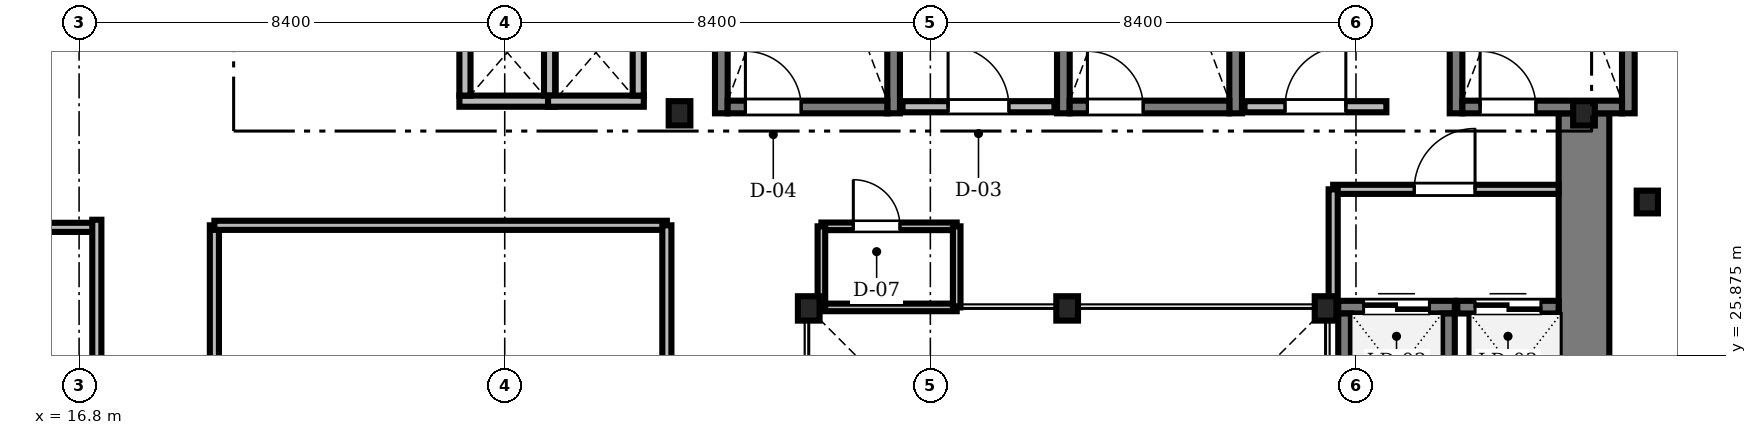
"""IFC4 building model, lengths in metres.
Left out: names, types, materials, properties, quantities, classifications, styles, units other than length and angle.
Written with IfcOpenShell. Run it as: python <this file> out.ifc"""

import sys

from ifc_helpers import new_model, si_unit, direction, frame, frame_2d, origin, origin_2d, place, context, subcontext, project, spatial, rectangle, i_section, extrude, source, transform, mapped, element, fill, save


model = new_model("IFC4")
c1 = context("Model", 3, precision=1e-05, world=origin(), true_north=direction((0.0, 1.0)))
c2 = subcontext(c1, "Body", "Model", "MODEL_VIEW")
j1 = project(units=[si_unit("LENGTHUNIT", "METRE"), si_unit("PLANEANGLEUNIT", "RADIAN")], contexts=[c1])
p1 = place(None, origin())
s1 = spatial("IfcSite", under=j1, at=p1, CompositionType="ELEMENT")
p2 = place(p1, origin())
s2 = spatial("IfcBuilding", under=s1, at=p2, CompositionType="ELEMENT")
p3 = place(p2, frame((0.0, 0.0, 86.0)))
s3 = spatial("IfcBuildingStorey", under=s2, at=p3, CompositionType="ELEMENT", Elevation=86.0)
m1 = source(origin(), c2, "Body", "SweptSolid", [
    extrude(rectangle(XDim=13.15, YDim=1.0, at=frame_2d((6.575, 0.0))), origin(), (0.0, 0.0, 1.0), 3.41),
])
p4 = place(p3, frame((46.5, 17.5, 0.0), z_axis=(0.0, 0.0, 1.0), x_axis=(0.0, 1.0, 0.0)))
e1 = element("IfcWall", 1, at=p4, inside=s3, PredefinedType="SHEAR", context=c2, shape_type="MappedRepresentation", body=[
    mapped(m1, transform((0.0, 0.0, 0.0), scale=1.0)),
])
m2 = source(origin(), c2, "Body", "SweptSolid", [
    extrude(i_section(OverallWidth=0.428, OverallDepth=0.481, WebThickness=0.04, FlangeThickness=0.063, FilletRadius=0.015, at=origin_2d()), origin(), (0.0, 0.0, 1.0), 3.41),
])
for number, where, z_axis, x_axis in (
    (2, (41.4, 26.8, 0.0), (0.0, 0.0, 1.0), (1.0, 0.0, 0.0)),
    (3, (36.3, 26.8, 0.0), (0.0, 0.0, 1.0), (1.0, 0.0, 0.0)),
    (4, (31.2, 26.8, 0.0), (0.0, 0.0, 1.0), (1.0, 0.0, 0.0)),
    (5, (28.65, 30.65, 0.0), (0.0, 0.0, 1.0), (1.0, 0.0, 0.0)),
    (6, (46.5, 30.65, 0.0), (0.0, 0.0, 1.0), (1.0, 0.0, 0.0)),
):
    element("IfcColumn", number, at=place(p3, frame(where, z_axis=z_axis, x_axis=x_axis)), inside=s3, PredefinedType="COLUMN", context=c2, shape_type="MappedRepresentation", body=[
        mapped(m2, transform((0.0, 0.0, 0.0), scale=1.0)),
    ])
m3 = source(origin(), c2, "Body", "SweptSolid", [
    extrude(i_section(OverallWidth=0.419, OverallDepth=0.449, WebThickness=0.031, FlangeThickness=0.048, FilletRadius=0.015, at=origin_2d()), origin(), (0.0, 0.0, 1.0), 3.41),
])
p5 = place(p3, frame((47.75, 28.9, 0.0), z_axis=(0.0, 0.0, 1.0), x_axis=(1.0, 0.0, 0.0)))
e7 = element("IfcColumn", 7, at=p5, inside=s3, PredefinedType="COLUMN", context=c2, shape_type="MappedRepresentation", body=[
    mapped(m3, transform((0.0, 0.0, 0.0), scale=1.0)),
])
m4 = source(origin(), c2, "Body", "SweptSolid", [
    extrude(rectangle(XDim=9.15, YDim=0.25, at=frame_2d((4.575, 0.0))), origin(), (0.0, 0.0, 1.0), 3.45),
])
for number, where, z_axis, x_axis in (
    (8, (29.475, 30.65, 0.0), (0.0, 0.0, 1.0), (0.0, 1.0, 0.0)),
    (9, (32.875, 30.65, 0.0), (0.0, 0.0, 1.0), (0.0, 1.0, 0.0)),
):
    element("IfcWall", number, at=place(p3, frame(where, z_axis=z_axis, x_axis=x_axis)), inside=s3, PredefinedType="SOLIDWALL", context=c2, shape_type="MappedRepresentation", body=[
        mapped(m4, transform((0.0, 0.0, 0.0), scale=1.0)),
    ])
m5 = source(origin(), c2, "Body", "SweptSolid", [
    extrude(rectangle(XDim=3.15, YDim=0.25, at=frame_2d((1.575, 0.0))), origin(), (0.0, 0.0, 1.0), 3.45),
])
p6 = place(p3, frame((29.6, 30.775, 0.0), z_axis=(0.0, 0.0, 1.0), x_axis=(1.0, 0.0, 0.0)))
e10 = element("IfcWall", 10, at=p6, inside=s3, PredefinedType="SOLIDWALL", context=c2, shape_type="MappedRepresentation", body=[
    mapped(m5, transform((0.0, 0.0, 0.0), scale=1.0)),
])
m6 = source(origin(), c2, "Body", "SweptSolid", [
    extrude(rectangle(XDim=1.1, YDim=2.2, at=frame_2d((0.55, 1.1))), frame((0.0, 0.135, 0.0), z_axis=(0.0, -1.0, 0.0), x_axis=(1.0, 0.0, 0.0)), (0.0, 0.0, 1.0), 0.27),
])
p7 = place(p6, frame((0.35, 0.0, 0.0)))
e11 = element("IfcOpeningElement", 11, at=p7, cuts=e10, PredefinedType="OPENING", context=c2, shape_type="MappedRepresentation", body=[
    mapped(m6, transform((0.0, 0.0, 0.0), scale=1.0)),
])
for number, where, z_axis, x_axis in (
    (12, (36.225, 30.65, 0.0), (0.0, 0.0, 1.0), (0.0, 1.0, 0.0)),
    (13, (39.625, 30.65, 0.0), (0.0, 0.0, 1.0), (0.0, 1.0, 0.0)),
):
    element("IfcWall", number, at=place(p3, frame(where, z_axis=z_axis, x_axis=x_axis)), inside=s3, PredefinedType="SOLIDWALL", context=c2, shape_type="MappedRepresentation", body=[
        mapped(m4, transform((0.0, 0.0, 0.0), scale=1.0)),
    ])
p8 = place(p3, frame((36.35, 30.775, 0.0), z_axis=(0.0, 0.0, 1.0), x_axis=(1.0, 0.0, 0.0)))
e14 = element("IfcWall", 14, at=p8, inside=s3, PredefinedType="SOLIDWALL", context=c2, shape_type="MappedRepresentation", body=[
    mapped(m5, transform((0.0, 0.0, 0.0), scale=1.0)),
])
p9 = place(p8, frame((0.35, 0.0, 0.0)))
e15 = element("IfcOpeningElement", 15, at=p9, cuts=e14, PredefinedType="OPENING", context=c2, shape_type="MappedRepresentation", body=[
    mapped(m6, transform((0.0, 0.0, 0.0), scale=1.0)),
])
for number, where, z_axis, x_axis in (
    (16, (43.975, 30.65, 0.0), (0.0, 0.0, 1.0), (0.0, 1.0, 0.0)),
    (17, (47.375, 30.65, 0.0), (0.0, 0.0, 1.0), (0.0, 1.0, 0.0)),
):
    element("IfcWall", number, at=place(p3, frame(where, z_axis=z_axis, x_axis=x_axis)), inside=s3, PredefinedType="SOLIDWALL", context=c2, shape_type="MappedRepresentation", body=[
        mapped(m4, transform((0.0, 0.0, 0.0), scale=1.0)),
    ])
p10 = place(p3, frame((44.1, 30.775, 0.0), z_axis=(0.0, 0.0, 1.0), x_axis=(1.0, 0.0, 0.0)))
e18 = element("IfcWall", 18, at=p10, inside=s3, PredefinedType="SOLIDWALL", context=c2, shape_type="MappedRepresentation", body=[
    mapped(m5, transform((0.0, 0.0, 0.0), scale=1.0)),
])
p11 = place(p10, frame((0.35, 0.0, 0.0)))
e19 = element("IfcOpeningElement", 19, at=p11, cuts=e18, PredefinedType="OPENING", context=c2, shape_type="MappedRepresentation", body=[
    mapped(m6, transform((0.0, 0.0, 0.0), scale=1.0)),
])
m7 = source(origin(), c2, "Body", "SweptSolid", [
    extrude(rectangle(XDim=3.0, YDim=0.22, at=frame_2d((1.5, 0.0))), origin(), (0.0, 0.0, 1.0), 3.41),
])
p12 = place(p3, frame((33.05, 30.78, 0.0), z_axis=(0.0, 0.0, 1.0), x_axis=(1.0, 0.0, 0.0)))
e20 = element("IfcWall", 20, at=p12, inside=s3, PredefinedType="SOLIDWALL", context=c2, shape_type="MappedRepresentation", body=[
    mapped(m7, transform((0.0, 0.0, 0.0), scale=1.0)),
])
m8 = source(origin(), c2, "Body", "SweptSolid", [
    extrude(rectangle(XDim=1.2, YDim=2.2, at=frame_2d((0.6, 1.1))), frame((0.0, 0.12, 0.0), z_axis=(0.0, -1.0, 0.0), x_axis=(1.0, 0.0, 0.0)), (0.0, 0.0, 1.0), 0.24),
])
p13 = place(p12, frame((0.9, 0.0, 0.0)))
e21 = element("IfcOpeningElement", 21, at=p13, cuts=e20, PredefinedType="OPENING", context=c2, shape_type="MappedRepresentation", body=[
    mapped(m8, transform((0.0, 0.0, 0.0), scale=1.0)),
])
m9 = source(origin(), c2, "Body", "SweptSolid", [
    extrude(rectangle(XDim=2.8, YDim=0.22, at=frame_2d((1.4, 0.0))), origin(), (0.0, 0.0, 1.0), 3.41),
])
p14 = place(p3, frame((39.8, 30.78, 0.0), z_axis=(0.0, 0.0, 1.0), x_axis=(1.0, 0.0, 0.0)))
e22 = element("IfcWall", 22, at=p14, inside=s3, PredefinedType="SOLIDWALL", context=c2, shape_type="MappedRepresentation", body=[
    mapped(m9, transform((0.0, 0.0, 0.0), scale=1.0)),
])
p15 = place(p14, frame((0.8, 0.0, 0.0)))
e23 = element("IfcOpeningElement", 23, at=p15, cuts=e22, PredefinedType="OPENING", context=c2, shape_type="MappedRepresentation", body=[
    mapped(m8, transform((0.0, 0.0, 0.0), scale=1.0)),
])
m10 = source(origin(), c2, "Body", "SweptSolid", [
    extrude(rectangle(XDim=1.89, YDim=0.22, at=frame_2d((0.945, 0.0))), origin(), (0.0, 0.0, 1.0), 3.41),
])
p16 = place(p3, frame((24.305, 30.89, 0.0), z_axis=(0.0, 0.0, 1.0), x_axis=(1.0, 0.0, 0.0)))
e24 = element("IfcWall", 24, at=p16, inside=s3, PredefinedType="SOLIDWALL", context=c2, shape_type="MappedRepresentation", body=[
    mapped(m10, transform((0.0, 0.0, 0.0), scale=1.0)),
])
m11 = source(origin(), c2, "Body", "SweptSolid", [
    extrude(rectangle(XDim=1.7, YDim=0.22, at=frame_2d((0.85, 0.0))), origin(), (0.0, 0.0, 1.0), 3.41),
])
for number, where, z_axis, x_axis in (
    (25, (24.415, 31.0, 0.0), (0.0, 0.0, 1.0), (0.0, 1.0, 0.0)),
    (26, (26.085, 31.0, 0.0), (0.0, 0.0, 1.0), (0.0, 1.0, 0.0)),
):
    element("IfcWall", number, at=place(p3, frame(where, z_axis=z_axis, x_axis=x_axis)), inside=s3, PredefinedType="SOLIDWALL", context=c2, shape_type="MappedRepresentation", body=[
        mapped(m11, transform((0.0, 0.0, 0.0), scale=1.0)),
    ])
p17 = place(p3, frame((26.055, 30.89, 0.0), z_axis=(0.0, 0.0, 1.0), x_axis=(1.0, 0.0, 0.0)))
e27 = element("IfcWall", 27, at=p17, inside=s3, PredefinedType="SOLIDWALL", context=c2, shape_type="MappedRepresentation", body=[
    mapped(m10, transform((0.0, 0.0, 0.0), scale=1.0)),
])
p18 = place(p3, frame((27.835, 31.0, 0.0), z_axis=(0.0, 0.0, 1.0), x_axis=(0.0, 1.0, 0.0)))
e28 = element("IfcWall", 28, at=p18, inside=s3, PredefinedType="SOLIDWALL", context=c2, shape_type="MappedRepresentation", body=[
    mapped(m11, transform((0.0, 0.0, 0.0), scale=1.0)),
])
m12 = source(origin(), c2, "Body", "SweptSolid", [
    extrude(rectangle(XDim=2.3, YDim=0.25, at=frame_2d((1.15, 0.0))), origin(), (0.0, 0.0, 1.0), 3.41),
])
p19 = place(p3, frame((41.65, 26.825, 0.0), z_axis=(0.0, 0.0, 1.0), x_axis=(1.0, 0.0, 0.0)))
e29 = element("IfcWall", 29, at=p19, inside=s3, PredefinedType="SOLIDWALL", context=c2, shape_type="MappedRepresentation", body=[
    mapped(m12, transform((0.0, 0.0, 0.0), scale=1.0)),
])
m13 = source(origin(), c2, "Body", "SweptSolid", [
    extrude(rectangle(XDim=1.3, YDim=2.3, at=frame_2d((0.65, 1.15))), frame((0.0, 0.135, 0.0), z_axis=(0.0, -1.0, 0.0), x_axis=(1.0, 0.0, 0.0)), (0.0, 0.0, 1.0), 0.27),
])
p20 = place(p19, frame((0.5, 0.0, 0.0)))
e30 = element("IfcOpeningElement", 30, at=p20, cuts=e29, PredefinedType="OPENING", context=c2, shape_type="MappedRepresentation", body=[
    mapped(m13, transform((0.0, 0.0, 0.0), scale=1.0)),
])
for number, where, z_axis, x_axis in (
    (31, (41.775, 24.4, 0.0), (0.0, 0.0, 1.0), (0.0, 1.0, 0.0)),
    (32, (43.825, 24.4, 0.0), (0.0, 0.0, 1.0), (0.0, 1.0, 0.0)),
):
    element("IfcWall", number, at=place(p3, frame(where, z_axis=z_axis, x_axis=x_axis)), inside=s3, PredefinedType="SOLIDWALL", context=c2, shape_type="MappedRepresentation", body=[
        mapped(m12, transform((0.0, 0.0, 0.0), scale=1.0)),
    ])
m14 = source(origin(), c2, "Body", "SweptSolid", [
    extrude(rectangle(XDim=2.0, YDim=0.25, at=frame_2d((1.0, 0.0))), origin(), (0.0, 0.0, 1.0), 3.41),
])
p21 = place(p3, frame((44.0, 26.825, 0.0), z_axis=(0.0, 0.0, 1.0), x_axis=(1.0, 0.0, 0.0)))
e33 = element("IfcWall", 33, at=p21, inside=s3, PredefinedType="SOLIDWALL", context=c2, shape_type="MappedRepresentation", body=[
    mapped(m14, transform((0.0, 0.0, 0.0), scale=1.0)),
])
p22 = place(p21, frame((0.35, 0.0, 0.0)))
e34 = element("IfcOpeningElement", 34, at=p22, cuts=e33, PredefinedType="OPENING", context=c2, shape_type="MappedRepresentation", body=[
    mapped(m13, transform((0.0, 0.0, 0.0), scale=1.0)),
])
m15 = source(origin(), c2, "Body", "SweptSolid", [
    extrude(rectangle(XDim=6.54, YDim=0.18, at=frame_2d((3.27, 0.0))), origin(), (0.0, 0.0, 1.0), 2.802),
])
p23 = place(p3, frame((19.47, 21.9, 0.0), z_axis=(0.0, 0.0, 1.0), x_axis=(0.0, 1.0, 0.0)))
e35 = element("IfcWall", 35, at=p23, inside=s3, PredefinedType="PARTITIONING", context=c2, shape_type="MappedRepresentation", body=[
    mapped(m15, transform((0.0, 0.0, 0.0), scale=1.0)),
])
m16 = source(origin(), c2, "Body", "SweptSolid", [
    extrude(rectangle(XDim=1.05, YDim=2.2, at=frame_2d((0.525, 1.1))), frame((0.0, 0.1, 0.0), z_axis=(0.0, -1.0, 0.0), x_axis=(1.0, 0.0, 0.0)), (0.0, 0.0, 1.0), 0.2),
])
p24 = place(p23, frame((2.2, 0.0, 0.0)))
e36 = element("IfcOpeningElement", 36, at=p24, cuts=e35, PredefinedType="OPENING", context=c2, shape_type="MappedRepresentation", body=[
    mapped(m16, transform((0.0, 0.0, 0.0), scale=1.0)),
])
m17 = source(origin(), c2, "Body", "SweptSolid", [
    extrude(rectangle(XDim=4.448, YDim=0.18, at=frame_2d((2.224, 0.0))), origin(), (0.0, 0.0, 1.0), 3.042),
])
p25 = place(p3, frame((41.55, 29.15, 0.0), z_axis=(0.0, 0.0, 1.0), x_axis=(1.0, 0.0, 0.0)))
e37 = element("IfcWall", 37, at=p25, inside=s3, PredefinedType="PARTITIONING", context=c2, shape_type="MappedRepresentation", body=[
    mapped(m17, transform((0.0, 0.0, 0.0), scale=1.0)),
])
m18 = source(origin(), c2, "Body", "SweptSolid", [
    extrude(rectangle(XDim=1.2, YDim=2.2, at=frame_2d((0.6, 1.1))), frame((0.0, 0.1, 0.0), z_axis=(0.0, -1.0, 0.0), x_axis=(1.0, 0.0, 0.0)), (0.0, 0.0, 1.0), 0.2),
])
p26 = place(p25, frame((1.6, 0.0, 0.0)))
e38 = element("IfcOpeningElement", 38, at=p26, cuts=e37, PredefinedType="OPENING", context=c2, shape_type="MappedRepresentation", body=[
    mapped(m18, transform((0.0, 0.0, 0.0), scale=1.0)),
])
m19 = source(origin(), c2, "Body", "SweptSolid", [
    extrude(rectangle(XDim=2.67, YDim=0.15, at=frame_2d((1.335, 0.0))), origin(), (0.0, 0.0, 1.0), 3.042),
])
p27 = place(p3, frame((31.45, 28.42, 0.0), z_axis=(0.0, 0.0, 1.0), x_axis=(1.0, 0.0, 0.0)))
e39 = element("IfcWall", 39, at=p27, inside=s3, PredefinedType="PARTITIONING", context=c2, shape_type="MappedRepresentation", body=[
    mapped(m19, transform((0.0, 0.0, 0.0), scale=1.0)),
])
m20 = source(origin(), c2, "Body", "SweptSolid", [
    extrude(rectangle(XDim=0.92, YDim=2.1, at=frame_2d((0.46, 1.05))), frame((0.0, 0.085, 0.0), z_axis=(0.0, -1.0, 0.0), x_axis=(1.0, 0.0, 0.0)), (0.0, 0.0, 1.0), 0.17),
])
p28 = place(p27, frame((0.63, 0.0, 0.0)))
e40 = element("IfcOpeningElement", 40, at=p28, cuts=e39, PredefinedType="OPENING", context=c2, shape_type="MappedRepresentation", body=[
    mapped(m20, transform((0.0, 0.0, 0.0), scale=1.0)),
])
m21 = source(origin(), c2, "Body", "SweptSolid", [
    extrude(rectangle(XDim=14.92, YDim=0.18, at=frame_2d((7.46, 0.0))), origin(), (0.0, 0.0, 1.0), 2.652),
])
p29 = place(p3, frame((2.23, 28.4, 0.0), z_axis=(0.0, 0.0, 1.0), x_axis=(1.0, 0.0, 0.0)))
e41 = element("IfcWall", 41, at=p29, inside=s3, PredefinedType="PARTITIONING", context=c2, shape_type="MappedRepresentation", body=[
    mapped(m21, transform((0.0, 0.0, 0.0), scale=1.0)),
])
m22 = source(origin(), c2, "Body", "SweptSolid", [
    extrude(rectangle(XDim=13.74, YDim=0.18, at=frame_2d((6.87, 0.0))), origin(), (0.0, 0.0, 1.0), 2.802),
])
p30 = place(p3, frame((17.15, 14.81, 0.0), z_axis=(0.0, 0.0, 1.0), x_axis=(0.0, 1.0, 0.0)))
e42 = element("IfcWall", 42, at=p30, inside=s3, PredefinedType="PARTITIONING", context=c2, shape_type="MappedRepresentation", body=[
    mapped(m22, transform((0.0, 0.0, 0.0), scale=1.0)),
])
m23 = source(origin(), c2, "Body", "SweptSolid", [
    extrude(rectangle(XDim=8.93, YDim=0.18, at=frame_2d((4.465, 0.0))), origin(), (0.0, 0.0, 1.0), 3.41),
])
p31 = place(p3, frame((19.47, 28.44, 0.0), z_axis=(0.0, 0.0, 1.0), x_axis=(1.0, 0.0, 0.0)))
e43 = element("IfcWall", 43, at=p31, inside=s3, PredefinedType="PARTITIONING", context=c2, shape_type="MappedRepresentation", body=[
    mapped(m23, transform((0.0, 0.0, 0.0), scale=1.0)),
])
p32 = place(p3, frame((28.4, 21.9, 0.0), z_axis=(0.0, 0.0, 1.0), x_axis=(0.0, 1.0, 0.0)))
e44 = element("IfcWall", 44, at=p32, inside=s3, PredefinedType="PARTITIONING", context=c2, shape_type="MappedRepresentation", body=[
    mapped(m15, transform((0.0, 0.0, 0.0), scale=1.0)),
])
m24 = source(origin(), c2, "Body", "SweptSolid", [
    extrude(rectangle(XDim=2.67, YDim=0.15, at=frame_2d((1.335, 0.0))), origin(), (0.0, 0.0, 1.0), 2.952),
])
p33 = place(p3, frame((31.45, 26.82, 0.0), z_axis=(0.0, 0.0, 1.0), x_axis=(1.0, 0.0, 0.0)))
e45 = element("IfcWall", 45, at=p33, inside=s3, PredefinedType="PARTITIONING", context=c2, shape_type="MappedRepresentation", body=[
    mapped(m24, transform((0.0, 0.0, 0.0), scale=1.0)),
])
m25 = source(origin(), c2, "Body", "SweptSolid", [
    extrude(rectangle(XDim=2.35, YDim=0.18, at=frame_2d((1.175, 0.0))), origin(), (0.0, 0.0, 1.0), 2.802),
])
p34 = place(p3, frame((41.55, 26.8, 0.0), z_axis=(0.0, 0.0, 1.0), x_axis=(0.0, 1.0, 0.0)))
e46 = element("IfcWall", 46, at=p34, inside=s3, PredefinedType="PARTITIONING", context=c2, shape_type="MappedRepresentation", body=[
    mapped(m25, transform((0.0, 0.0, 0.0), scale=1.0)),
])
m26 = source(origin(), c2, "Body", "SweptSolid", [
    extrude(rectangle(XDim=1.6, YDim=0.15, at=frame_2d((0.8, 0.0))), origin(), (0.0, 0.0, 1.0), 2.952),
])
for number, where, z_axis, x_axis in (
    (47, (31.45, 26.82, 0.0), (0.0, 0.0, 1.0), (0.0, 1.0, 0.0)),
    (48, (34.12, 26.82, 0.0), (0.0, 0.0, 1.0), (0.0, 1.0, 0.0)),
):
    element("IfcWall", number, at=place(p3, frame(where, z_axis=z_axis, x_axis=x_axis)), inside=s3, PredefinedType="PARTITIONING", context=c2, shape_type="MappedRepresentation", body=[
        mapped(m26, transform((0.0, 0.0, 0.0), scale=1.0)),
    ])
m27 = source(origin(), c2, "Body", "SweptSolid", [
    extrude(rectangle(XDim=1.1, YDim=2.2, at=frame_2d((0.55, 1.1))), frame((0.0, 0.025, 0.0), z_axis=(0.0, -1.0, 0.0), x_axis=(1.0, 0.0, 0.0)), (0.0, 0.0, 1.0), 0.05),
])
p35 = place(p7, origin())
e49 = element("IfcDoor", 49, at=p35, inside=s3, OperationType="SINGLE_SWING_LEFT", PredefinedType="DOOR", context=c2, shape_type="MappedRepresentation", body=[
    mapped(m27, transform((0.0, 0.0, 0.0), scale=1.0)),
])
fill(e11, e49)
p36 = place(p9, origin())
e50 = element("IfcDoor", 50, at=p36, inside=s3, OperationType="SINGLE_SWING_LEFT", PredefinedType="DOOR", context=c2, shape_type="MappedRepresentation", body=[
    mapped(m27, transform((0.0, 0.0, 0.0), scale=1.0)),
])
fill(e15, e50)
p37 = place(p11, origin())
e51 = element("IfcDoor", 51, at=p37, inside=s3, OperationType="SINGLE_SWING_LEFT", PredefinedType="DOOR", context=c2, shape_type="MappedRepresentation", body=[
    mapped(m27, transform((0.0, 0.0, 0.0), scale=1.0)),
])
fill(e19, e51)
m28 = source(origin(), c2, "Body", "SweptSolid", [
    extrude(rectangle(XDim=1.2, YDim=2.2, at=frame_2d((0.6, 1.1))), frame((0.0, 0.025, 0.0), z_axis=(0.0, -1.0, 0.0), x_axis=(1.0, 0.0, 0.0)), (0.0, 0.0, 1.0), 0.05),
])
p38 = place(p13, origin())
e52 = element("IfcDoor", 52, at=p38, inside=s3, OperationType="SINGLE_SWING_LEFT", PredefinedType="DOOR", context=c2, shape_type="MappedRepresentation", body=[
    mapped(m28, transform((0.0, 0.0, 0.0), scale=1.0)),
])
fill(e21, e52)
p39 = place(p15, origin())
e53 = element("IfcDoor", 53, at=p39, inside=s3, OperationType="SINGLE_SWING_RIGHT", PredefinedType="DOOR", context=c2, shape_type="MappedRepresentation", body=[
    mapped(m28, transform((0.0, 0.0, 0.0), scale=1.0)),
])
fill(e23, e53)
m29 = source(origin(), c2, "Body", "SweptSolid", [
    extrude(rectangle(XDim=1.3, YDim=2.3, at=frame_2d((0.65, 1.15))), frame((0.0, 0.025, 0.0), z_axis=(0.0, -1.0, 0.0), x_axis=(1.0, 0.0, 0.0)), (0.0, 0.0, 1.0), 0.05),
])
p40 = place(p20, origin())
e54 = element("IfcDoor", 54, at=p40, inside=s3, OperationType="DOUBLE_DOOR_SLIDING", PredefinedType="DOOR", context=c2, shape_type="MappedRepresentation", body=[
    mapped(m29, transform((0.0, 0.0, 0.0), scale=1.0)),
])
fill(e30, e54)
p41 = place(p22, origin())
e55 = element("IfcDoor", 55, at=p41, inside=s3, OperationType="DOUBLE_DOOR_SLIDING", PredefinedType="DOOR", context=c2, shape_type="MappedRepresentation", body=[
    mapped(m29, transform((0.0, 0.0, 0.0), scale=1.0)),
])
fill(e34, e55)
p42 = place(p26, origin())
e56 = element("IfcDoor", 56, at=p42, inside=s3, OperationType="SINGLE_SWING_RIGHT", PredefinedType="DOOR", context=c2, shape_type="MappedRepresentation", body=[
    mapped(m28, transform((0.0, 0.0, 0.0), scale=1.0)),
])
fill(e38, e56)
m30 = source(origin(), c2, "Body", "SweptSolid", [
    extrude(rectangle(XDim=0.92, YDim=2.1, at=frame_2d((0.46, 1.05))), frame((0.0, 0.025, 0.0), z_axis=(0.0, -1.0, 0.0), x_axis=(1.0, 0.0, 0.0)), (0.0, 0.0, 1.0), 0.05),
])
p43 = place(p28, origin())
e57 = element("IfcDoor", 57, at=p43, inside=s3, OperationType="SINGLE_SWING_LEFT", PredefinedType="DOOR", context=c2, shape_type="MappedRepresentation", body=[
    mapped(m30, transform((0.0, 0.0, 0.0), scale=1.0)),
])
fill(e40, e57)
save(model, sys.argv[1])
